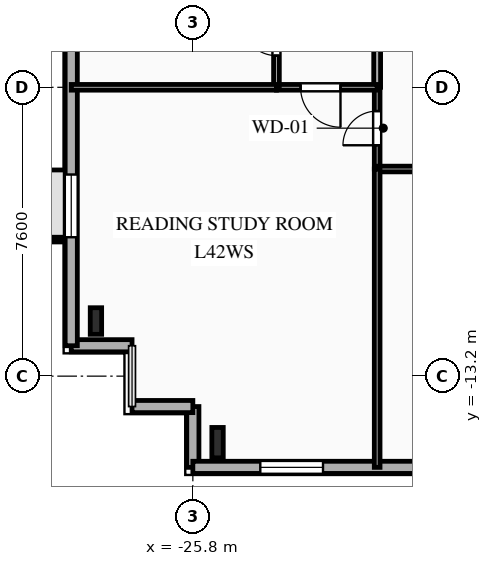
"""IFC4 building model, lengths in metres.
Left out: names, types, materials, properties, quantities, classifications, styles, units other than length and angle.
Written with IfcOpenShell. Run it as: python <this file> out.ifc"""

import sys

from ifc_helpers import new_model, si_unit, direction, frame, frame_2d, origin, origin_2d, place, context, subcontext, project, spatial, rectangle, i_section, extrude, element, fill, save


model = new_model("IFC4")
c1 = context("Model", 3, precision=1e-05, world=origin(), true_north=direction((0.0, 1.0)))
c2 = subcontext(c1, "Body", "Model", "MODEL_VIEW")
j1 = project(units=[si_unit("LENGTHUNIT", "METRE"), si_unit("PLANEANGLEUNIT", "RADIAN")], contexts=[c1])
p1 = place(None, origin())
s1 = spatial("IfcSite", under=j1, at=p1, CompositionType="ELEMENT")
p2 = place(p1, origin())
s2 = spatial("IfcBuilding", under=s1, at=p2, CompositionType="ELEMENT")
p3 = place(p2, frame((0.0, 0.0, 151.1)))
s3 = spatial("IfcBuildingStorey", under=s2, at=p3, CompositionType="ELEMENT", Elevation=151.1)
p4 = place(p3, frame((-25.15, -14.95, 0.0), z_axis=(0.0, 0.0, 1.0), x_axis=(1.0, 0.0, 0.0)))
e1 = element("IfcColumn", 1, at=p4, inside=s3, PredefinedType="COLUMN", context=c2, shape_type="SweptSolid", body=[
    extrude(i_section(OverallWidth=0.3, OverallDepth=0.8, WebThickness=0.018, FlangeThickness=0.033, FilletRadius=0.03, at=origin_2d()), origin(), (0.0, 0.0, 1.0), 3.35),
])
p5 = place(p3, frame((-28.35, -11.75, 0.0), z_axis=(0.0, 0.0, 1.0), x_axis=(1.0, 0.0, 0.0)))
e2 = element("IfcColumn", 2, at=p5, inside=s3, PredefinedType="COLUMN", context=c2, shape_type="SweptSolid", body=[
    extrude(i_section(OverallWidth=0.3, OverallDepth=0.7, WebThickness=0.017, FlangeThickness=0.032, FilletRadius=0.027, at=origin_2d()), origin(), (0.0, 0.0, 1.0), 3.35),
])
p6 = place(p3, frame((-25.8, -15.6, 0.0), z_axis=(0.0, 0.0, 1.0), x_axis=(0.0, 1.0, 0.0)))
e3 = element("IfcWall", 3, at=p6, inside=s3, PredefinedType="SOLIDWALL", context=c2, shape_type="SweptSolid", body=[
    extrude(rectangle(XDim=1.6, YDim=0.32, at=frame_2d((0.8, 0.0))), origin(), (0.0, 0.0, 1.0), 3.04),
])
p7 = place(p3, frame((-25.8, -14.0, 0.0), z_axis=(0.0, 0.0, 1.0), x_axis=(-1.0, 0.0, 0.0)))
e4 = element("IfcWall", 4, at=p7, inside=s3, PredefinedType="SOLIDWALL", context=c2, shape_type="SweptSolid", body=[
    extrude(rectangle(XDim=1.6, YDim=0.32, at=frame_2d((0.8, 0.0))), origin(), (0.0, 0.0, 1.0), 3.04),
])
p8 = place(p3, frame((-27.4, -12.4, 0.0), z_axis=(0.0, 0.0, 1.0), x_axis=(-1.0, 0.0, 0.0)))
e5 = element("IfcWall", 5, at=p8, inside=s3, PredefinedType="SOLIDWALL", context=c2, shape_type="SweptSolid", body=[
    extrude(rectangle(XDim=1.6, YDim=0.32, at=frame_2d((0.8, 0.0))), origin(), (0.0, 0.0, 1.0), 3.04),
])
p9 = place(p3, frame((-29.0, -12.4, 0.0), z_axis=(0.0, 0.0, 1.0), x_axis=(0.0, 1.0, 0.0)))
e6 = element("IfcWall", 6, at=p9, inside=s3, PredefinedType="SOLIDWALL", context=c2, shape_type="SweptSolid", body=[
    extrude(rectangle(XDim=29.6, YDim=0.32, at=frame_2d((14.8, 0.0))), origin(), (0.0, 0.0, 1.0), 3.04),
])
p10 = place(p9, frame((2.855, 0.0, 0.85)))
e7 = element("IfcOpeningElement", 7, at=p10, cuts=e6, PredefinedType="OPENING", context=c2, shape_type="SweptSolid", body=[
    extrude(rectangle(XDim=1.65, YDim=1.85, at=frame_2d((0.825, 0.925))), frame((0.0, 0.17, 0.0), z_axis=(0.0, -1.0, 0.0), x_axis=(1.0, 0.0, 0.0)), (0.0, 0.0, 1.0), 0.34),
])
p11 = place(p9, frame((9.865, 0.0, 0.85)))
e8 = element("IfcOpeningElement", 8, at=p11, cuts=e6, PredefinedType="OPENING", context=c2, shape_type="SweptSolid", body=[
    extrude(rectangle(XDim=1.95, YDim=1.85, at=frame_2d((0.975, 0.925))), frame((0.0, 0.17, 0.0), z_axis=(0.0, -1.0, 0.0), x_axis=(1.0, 0.0, 0.0)), (0.0, 0.0, 1.0), 0.34),
])
p12 = place(p9, frame((13.13, 0.0, 0.85)))
e9 = element("IfcOpeningElement", 9, at=p12, cuts=e6, PredefinedType="OPENING", context=c2, shape_type="SweptSolid", body=[
    extrude(rectangle(XDim=1.5, YDim=1.85, at=frame_2d((0.75, 0.925))), frame((0.0, 0.17, 0.0), z_axis=(0.0, -1.0, 0.0), x_axis=(1.0, 0.0, 0.0)), (0.0, 0.0, 1.0), 0.34),
])
p13 = place(p9, frame((15.93, 0.0, 0.85)))
e10 = element("IfcOpeningElement", 10, at=p13, cuts=e6, PredefinedType="OPENING", context=c2, shape_type="SweptSolid", body=[
    extrude(rectangle(XDim=1.5, YDim=1.85, at=frame_2d((0.75, 0.925))), frame((0.0, 0.17, 0.0), z_axis=(0.0, -1.0, 0.0), x_axis=(1.0, 0.0, 0.0)), (0.0, 0.0, 1.0), 0.34),
])
p14 = place(p9, frame((18.77, 0.0, 0.85)))
e11 = element("IfcOpeningElement", 11, at=p14, cuts=e6, PredefinedType="OPENING", context=c2, shape_type="SweptSolid", body=[
    extrude(rectangle(XDim=1.5, YDim=1.85, at=frame_2d((0.75, 0.925))), frame((0.0, 0.17, 0.0), z_axis=(0.0, -1.0, 0.0), x_axis=(1.0, 0.0, 0.0)), (0.0, 0.0, 1.0), 0.34),
])
p15 = place(p9, frame((24.255, 0.0, 0.85)))
e12 = element("IfcOpeningElement", 12, at=p15, cuts=e6, PredefinedType="OPENING", context=c2, shape_type="SweptSolid", body=[
    extrude(rectangle(XDim=1.65, YDim=1.85, at=frame_2d((0.825, 0.925))), frame((0.0, 0.17, 0.0), z_axis=(0.0, -1.0, 0.0), x_axis=(1.0, 0.0, 0.0)), (0.0, 0.0, 1.0), 0.34),
])
p16 = place(p3, frame((23.8, -15.6, 0.0), z_axis=(0.0, 0.0, 1.0), x_axis=(-1.0, 0.0, 0.0)))
e13 = element("IfcWall", 13, at=p16, inside=s3, PredefinedType="SOLIDWALL", context=c2, shape_type="SweptSolid", body=[
    extrude(rectangle(XDim=49.6, YDim=0.32, at=frame_2d((24.8, 0.0))), origin(), (0.0, 0.0, 1.0), 3.04),
])
p17 = place(p16, frame((1.13, 0.0, 0.85)))
e14 = element("IfcOpeningElement", 14, at=p17, cuts=e13, PredefinedType="OPENING", context=c2, shape_type="SweptSolid", body=[
    extrude(rectangle(XDim=1.1, YDim=1.85, at=frame_2d((0.55, 0.925))), frame((0.0, 0.17, 0.0), z_axis=(0.0, -1.0, 0.0), x_axis=(1.0, 0.0, 0.0)), (0.0, 0.0, 1.0), 0.34),
])
p18 = place(p16, frame((5.055, 0.0, 0.85)))
e15 = element("IfcOpeningElement", 15, at=p18, cuts=e13, PredefinedType="OPENING", context=c2, shape_type="SweptSolid", body=[
    extrude(rectangle(XDim=1.65, YDim=1.85, at=frame_2d((0.825, 0.925))), frame((0.0, 0.17, 0.0), z_axis=(0.0, -1.0, 0.0), x_axis=(1.0, 0.0, 0.0)), (0.0, 0.0, 1.0), 0.34),
])
p19 = place(p16, frame((10.78, 0.0, 0.85)))
e16 = element("IfcOpeningElement", 16, at=p19, cuts=e13, PredefinedType="OPENING", context=c2, shape_type="SweptSolid", body=[
    extrude(rectangle(XDim=2.2, YDim=1.85, at=frame_2d((1.1, 0.925))), frame((0.0, 0.17, 0.0), z_axis=(0.0, -1.0, 0.0), x_axis=(1.0, 0.0, 0.0)), (0.0, 0.0, 1.0), 0.34),
])
p20 = place(p16, frame((17.284, 0.0, 0.85)))
e17 = element("IfcOpeningElement", 17, at=p20, cuts=e13, PredefinedType="OPENING", context=c2, shape_type="SweptSolid", body=[
    extrude(rectangle(XDim=2.2, YDim=1.85, at=frame_2d((1.1, 0.925))), frame((0.0, 0.17, 0.0), z_axis=(0.0, -1.0, 0.0), x_axis=(1.0, 0.0, 0.0)), (0.0, 0.0, 1.0), 0.34),
])
p21 = place(p16, frame((22.248, 0.0, 0.85)))
e18 = element("IfcOpeningElement", 18, at=p21, cuts=e13, PredefinedType="OPENING", context=c2, shape_type="SweptSolid", body=[
    extrude(rectangle(XDim=2.2, YDim=1.85, at=frame_2d((1.1, 0.925))), frame((0.0, 0.17, 0.0), z_axis=(0.0, -1.0, 0.0), x_axis=(1.0, 0.0, 0.0)), (0.0, 0.0, 1.0), 0.34),
])
p22 = place(p16, frame((28.7, 0.0, 0.85)))
e19 = element("IfcOpeningElement", 19, at=p22, cuts=e13, PredefinedType="OPENING", context=c2, shape_type="SweptSolid", body=[
    extrude(rectangle(XDim=2.2, YDim=1.85, at=frame_2d((1.1, 0.925))), frame((0.0, 0.17, 0.0), z_axis=(0.0, -1.0, 0.0), x_axis=(1.0, 0.0, 0.0)), (0.0, 0.0, 1.0), 0.34),
])
p23 = place(p16, frame((34.7, 0.0, 0.85)))
e20 = element("IfcOpeningElement", 20, at=p23, cuts=e13, PredefinedType="OPENING", context=c2, shape_type="SweptSolid", body=[
    extrude(rectangle(XDim=2.2, YDim=1.85, at=frame_2d((1.1, 0.925))), frame((0.0, 0.17, 0.0), z_axis=(0.0, -1.0, 0.0), x_axis=(1.0, 0.0, 0.0)), (0.0, 0.0, 1.0), 0.34),
])
p24 = place(p16, frame((41.492, 0.0, 0.85)))
e21 = element("IfcOpeningElement", 21, at=p24, cuts=e13, PredefinedType="OPENING", context=c2, shape_type="SweptSolid", body=[
    extrude(rectangle(XDim=1.65, YDim=1.85, at=frame_2d((0.825, 0.925))), frame((0.0, 0.17, 0.0), z_axis=(0.0, -1.0, 0.0), x_axis=(1.0, 0.0, 0.0)), (0.0, 0.0, 1.0), 0.34),
])
p25 = place(p16, frame((46.175, 0.0, 0.85)))
e22 = element("IfcOpeningElement", 22, at=p25, cuts=e13, PredefinedType="OPENING", context=c2, shape_type="SweptSolid", body=[
    extrude(rectangle(XDim=1.65, YDim=1.85, at=frame_2d((0.825, 0.925))), frame((0.0, 0.17, 0.0), z_axis=(0.0, -1.0, 0.0), x_axis=(1.0, 0.0, 0.0)), (0.0, 0.0, 1.0), 0.34),
])
p26 = place(p3, frame((-20.95, -7.75, 0.0), z_axis=(0.0, 0.0, 1.0), x_axis=(0.0, 1.0, 0.0)))
e23 = element("IfcWall", 23, at=p26, inside=s3, PredefinedType="PARTITIONING", context=c2, shape_type="SweptSolid", body=[
    extrude(rectangle(XDim=2.15, YDim=0.15, at=frame_2d((1.075, 0.0))), origin(), (0.0, 0.0, 1.0), 3.04),
])
p27 = place(p26, frame((0.625, 0.0, 0.0)))
e24 = element("IfcOpeningElement", 24, at=p27, cuts=e23, PredefinedType="OPENING", context=c2, shape_type="SweptSolid", body=[
    extrude(rectangle(XDim=0.9, YDim=2.1, at=frame_2d((0.45, 1.05))), frame((0.0, 0.085, 0.0), z_axis=(0.0, -1.0, 0.0), x_axis=(1.0, 0.0, 0.0)), (0.0, 0.0, 1.0), 0.17),
])
p28 = place(p3, frame((-14.964, -7.75, 0.0), z_axis=(0.0, 0.0, 1.0), x_axis=(-1.0, 0.0, 0.0)))
e25 = element("IfcWall", 25, at=p28, inside=s3, PredefinedType="PARTITIONING", context=c2, shape_type="SweptSolid", body=[
    extrude(rectangle(XDim=5.986, YDim=0.15, at=frame_2d((2.993, 0.0))), origin(), (0.0, 0.0, 1.0), 3.04),
])
p29 = place(p28, frame((1.052, 0.0, 0.0)))
e26 = element("IfcOpeningElement", 26, at=p29, cuts=e25, PredefinedType="OPENING", context=c2, shape_type="SweptSolid", body=[
    extrude(rectangle(XDim=1.05, YDim=2.15, at=frame_2d((0.525, 1.075))), frame((0.0, 0.085, 0.0), z_axis=(0.0, -1.0, 0.0), x_axis=(1.0, 0.0, 0.0)), (0.0, 0.0, 1.0), 0.17),
])
p30 = place(p3, frame((-20.95, -5.6, 0.0), z_axis=(0.0, 0.0, 1.0), x_axis=(0.0, 1.0, 0.0)))
e27 = element("IfcWall", 27, at=p30, inside=s3, PredefinedType="PARTITIONING", context=c2, shape_type="SweptSolid", body=[
    extrude(rectangle(XDim=14.1, YDim=0.18, at=frame_2d((7.05, 0.0))), origin(), (0.0, 0.0, 1.0), 3.04),
])
p31 = place(p30, frame((5.058, 0.0, 0.0)))
e28 = element("IfcOpeningElement", 28, at=p31, cuts=e27, PredefinedType="OPENING", context=c2, shape_type="SweptSolid", body=[
    extrude(rectangle(XDim=1.0, YDim=2.15, at=frame_2d((0.5, 1.075))), frame((0.0, 0.1, 0.0), z_axis=(0.0, -1.0, 0.0), x_axis=(1.0, 0.0, 0.0)), (0.0, 0.0, 1.0), 0.2),
])
p32 = place(p3, frame((-20.95, -5.6, 0.0), z_axis=(0.0, 0.0, 1.0), x_axis=(-1.0, 0.0, 0.0)))
e29 = element("IfcWall", 29, at=p32, inside=s3, PredefinedType="PARTITIONING", context=c2, shape_type="SweptSolid", body=[
    extrude(rectangle(XDim=2.65, YDim=0.15, at=frame_2d((1.325, 0.0))), origin(), (0.0, 0.0, 1.0), 3.04),
])
p33 = place(p32, frame((0.965, 0.0, 0.0)))
e30 = element("IfcOpeningElement", 30, at=p33, cuts=e29, PredefinedType="OPENING", context=c2, shape_type="SweptSolid", body=[
    extrude(rectangle(XDim=1.05, YDim=2.15, at=frame_2d((0.525, 1.075))), frame((0.0, 0.085, 0.0), z_axis=(0.0, -1.0, 0.0), x_axis=(1.0, 0.0, 0.0)), (0.0, 0.0, 1.0), 0.17),
])
p34 = place(p3, frame((-23.6, -5.6, 0.0), z_axis=(0.0, 0.0, 1.0), x_axis=(0.0, 1.0, 0.0)))
e31 = element("IfcWall", 31, at=p34, inside=s3, PredefinedType="PLUMBINGWALL", context=c2, shape_type="SweptSolid", body=[
    extrude(rectangle(XDim=2.35, YDim=0.15, at=frame_2d((1.175, 0.0))), origin(), (0.0, 0.0, 1.0), 2.695),
])
p35 = place(p34, frame((0.834, 0.0, 0.0)))
e32 = element("IfcOpeningElement", 32, at=p35, cuts=e31, PredefinedType="OPENING", context=c2, shape_type="SweptSolid", body=[
    extrude(rectangle(XDim=0.9, YDim=2.1, at=frame_2d((0.45, 1.05))), frame((0.0, 0.085, 0.0), z_axis=(0.0, -1.0, 0.0), x_axis=(1.0, 0.0, 0.0)), (0.0, 0.0, 1.0), 0.17),
])
p36 = place(p3, frame((-29.0, -5.6, 0.0), z_axis=(0.0, 0.0, 1.0), x_axis=(1.0, 0.0, 0.0)))
e33 = element("IfcWall", 33, at=p36, inside=s3, PredefinedType="PLUMBINGWALL", context=c2, shape_type="SweptSolid", body=[
    extrude(rectangle(XDim=5.4, YDim=0.15, at=frame_2d((2.7, 0.0))), origin(), (0.0, 0.0, 1.0), 3.04),
])
p37 = place(p3, frame((-20.95, -7.75, 0.0), z_axis=(0.0, 0.0, 1.0), x_axis=(0.0, -1.0, 0.0)))
e34 = element("IfcWall", 34, at=p37, inside=s3, PredefinedType="PARTITIONING", context=c2, shape_type="SweptSolid", body=[
    extrude(rectangle(XDim=7.85, YDim=0.15, at=frame_2d((3.925, 0.0))), origin(), (0.0, 0.0, 1.0), 3.04),
])
p38 = place(p10, origin())
e35 = element("IfcWindow", 35, at=p38, inside=s3, PartitioningType="SINGLE_PANEL", PredefinedType="WINDOW", context=c2, shape_type="SweptSolid", body=[
    extrude(rectangle(XDim=1.65, YDim=1.85, at=frame_2d((0.825, 0.925))), frame((0.0, 0.03, 0.0), z_axis=(0.0, -1.0, 0.0), x_axis=(1.0, 0.0, 0.0)), (0.0, 0.0, 1.0), 0.06),
])
fill(e7, e35)
p39 = place(p25, origin())
e36 = element("IfcWindow", 36, at=p39, inside=s3, PartitioningType="SINGLE_PANEL", PredefinedType="WINDOW", context=c2, shape_type="SweptSolid", body=[
    extrude(rectangle(XDim=1.65, YDim=1.85, at=frame_2d((0.825, 0.925))), frame((0.0, 0.03, 0.0), z_axis=(0.0, -1.0, 0.0), x_axis=(1.0, 0.0, 0.0)), (0.0, 0.0, 1.0), 0.06),
])
fill(e22, e36)
p40 = place(p27, origin())
e37 = element("IfcDoor", 37, at=p40, inside=s3, OperationType="SINGLE_SWING_LEFT", PredefinedType="DOOR", context=c2, shape_type="SweptSolid", body=[
    extrude(rectangle(XDim=0.9, YDim=2.1, at=frame_2d((0.45, 1.05))), frame((0.0, 0.025, 0.0), z_axis=(0.0, -1.0, 0.0), x_axis=(1.0, 0.0, 0.0)), (0.0, 0.0, 1.0), 0.05),
])
fill(e24, e37)
p41 = place(p33, origin())
e38 = element("IfcDoor", 38, at=p41, inside=s3, OperationType="SINGLE_SWING_LEFT", PredefinedType="DOOR", context=c2, shape_type="SweptSolid", body=[
    extrude(rectangle(XDim=1.05, YDim=2.15, at=frame_2d((0.525, 1.075))), frame((0.0, 0.025, 0.0), z_axis=(0.0, -1.0, 0.0), x_axis=(1.0, 0.0, 0.0)), (0.0, 0.0, 1.0), 0.05),
])
fill(e30, e38)
p42 = place(p35, origin())
e39 = element("IfcDoor", 39, at=p42, inside=s3, OperationType="SINGLE_SWING_RIGHT", PredefinedType="DOOR", context=c2, shape_type="SweptSolid", body=[
    extrude(rectangle(XDim=0.9, YDim=2.1, at=frame_2d((0.45, 1.05))), frame((0.0, 0.025, 0.0), z_axis=(0.0, -1.0, 0.0), x_axis=(1.0, 0.0, 0.0)), (0.0, 0.0, 1.0), 0.05),
])
fill(e32, e39)
save(model, sys.argv[1])
